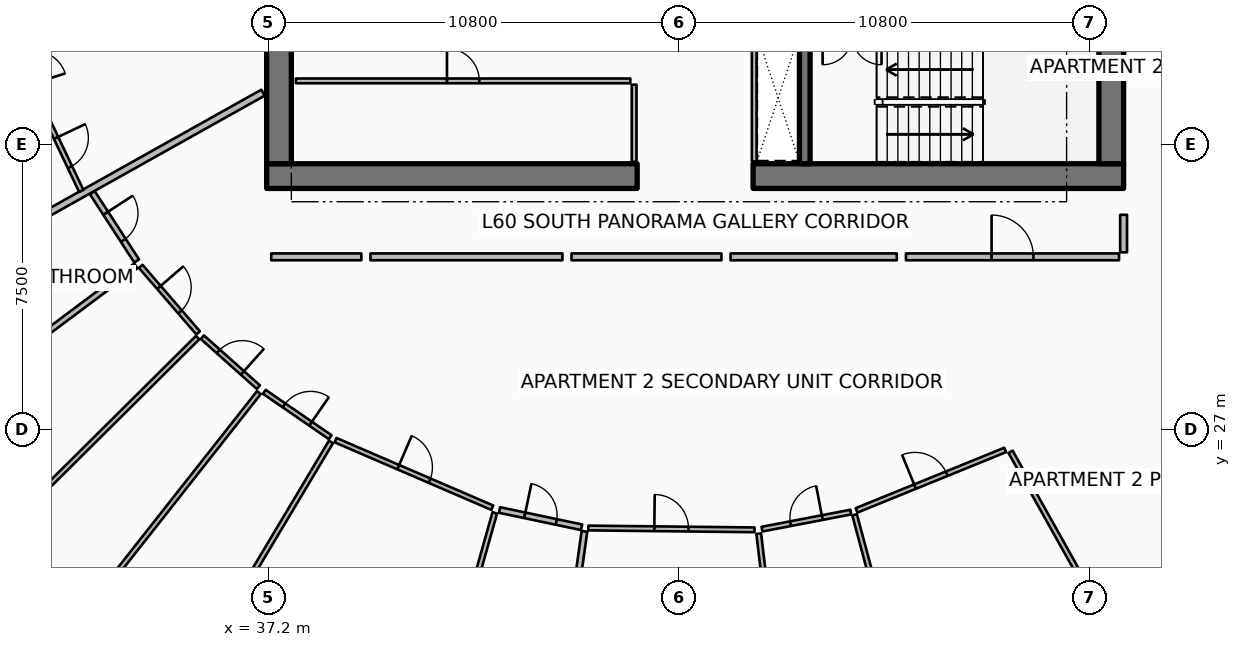
"""IFC4 building model, lengths in metres.
Left out: names, types, materials, properties, quantities, classifications, styles, units other than length and angle.
Written with IfcOpenShell. Run it as: python <this file> out.ifc"""

import sys

from ifc_helpers import new_model, si_unit, direction, frame, frame_2d, origin, place, context, subcontext, project, spatial, rectangle, extrude, element, fill, save


model = new_model("IFC4")
c1 = context("Model", 3, precision=1e-05, world=origin(), true_north=direction((0.0, 1.0)))
c2 = subcontext(c1, "Body", "Model", "MODEL_VIEW")
j1 = project(units=[si_unit("LENGTHUNIT", "METRE"), si_unit("PLANEANGLEUNIT", "RADIAN")], contexts=[c1])
p1 = place(None, origin())
s1 = spatial("IfcSite", under=j1, at=p1, CompositionType="ELEMENT")
p2 = place(p1, origin())
s2 = spatial("IfcBuilding", under=s1, at=p2, CompositionType="ELEMENT")
p3 = place(p2, frame((0.0, 0.0, 240.55)))
s3 = spatial("IfcBuildingStorey", under=s2, at=p3, CompositionType="ELEMENT", Elevation=240.55)
for number, where, z_axis, x_axis in (
    (1, (37.15, 33.675, 0.0), (0.0, 0.0, 1.0), (1.0, 0.0, 0.0)),
    (2, (49.95, 33.675, 0.0), (0.0, 0.0, 1.0), (1.0, 0.0, 0.0)),
):
    element("IfcWall", number, at=place(p3, frame(where, z_axis=z_axis, x_axis=x_axis)), inside=s3, PredefinedType="SHEAR", context=c2, shape_type="SweptSolid", body=[
        extrude(rectangle(XDim=9.75, YDim=0.65, at=frame_2d((4.875, 0.0))), origin(), (0.0, 0.0, 1.0), 3.85),
    ])
for number, where, z_axis, x_axis in (
    (3, (37.475, 34.0, 0.0), (0.0, 0.0, 1.0), (0.0, 1.0, 0.0)),
    (4, (59.375, 34.0, 0.0), (0.0, 0.0, 1.0), (0.0, 1.0, 0.0)),
):
    element("IfcWall", number, at=place(p3, frame(where, z_axis=z_axis, x_axis=x_axis)), inside=s3, PredefinedType="SHEAR", context=c2, shape_type="SweptSolid", body=[
        extrude(rectangle(XDim=16.0, YDim=0.65, at=frame_2d((8.0, 0.0))), origin(), (0.0, 0.0, 1.0), 3.85),
    ])
p4 = place(p3, frame((51.31, 34.0, 0.0), z_axis=(0.0, 0.0, 1.0), x_axis=(0.0, 1.0, 0.0)))
e5 = element("IfcWall", 5, at=p4, inside=s3, PredefinedType="SHEAR", context=c2, shape_type="SweptSolid", body=[
    extrude(rectangle(XDim=3.5, YDim=0.28, at=frame_2d((1.75, 0.0))), origin(), (0.0, 0.0, 1.0), 3.85),
])
p5 = place(p3, frame((46.82, 34.05, 0.0), z_axis=(0.0, 0.0, 1.0), x_axis=(0.0, 1.0, 0.0)))
e6 = element("IfcWall", 6, at=p5, inside=s3, PredefinedType="PARTITIONING", context=c2, shape_type="SweptSolid", body=[
    extrude(rectangle(XDim=2.03, YDim=0.125, at=frame_2d((1.015, 0.0))), origin(), (0.0, 0.0, 1.0), 3.03),
])
p6 = place(p3, frame((37.92, 36.18, 0.0), z_axis=(0.0, 0.0, 1.0), x_axis=(1.0, 0.0, 0.0)))
e7 = element("IfcWall", 7, at=p6, inside=s3, PredefinedType="PARTITIONING", context=c2, shape_type="SweptSolid", body=[
    extrude(rectangle(XDim=8.8, YDim=0.125, at=frame_2d((4.4, 0.0))), origin(), (0.0, 0.0, 1.0), 3.03),
])
p7 = place(p6, frame((3.975, 0.0, 0.0)))
e8 = element("IfcOpeningElement", 8, at=p7, cuts=e7, PredefinedType="OPENING", context=c2, shape_type="SweptSolid", body=[
    extrude(rectangle(XDim=0.85, YDim=2.06, at=frame_2d((0.425, 1.03))), frame((0.0, 0.073, 0.0), z_axis=(0.0, -1.0, 0.0), x_axis=(1.0, 0.0, 0.0)), (0.0, 0.0, 1.0), 0.145),
])
p8 = place(p3, frame((49.98, 34.06, 0.0), z_axis=(0.0, 0.0, 1.0), x_axis=(0.0, 1.0, 0.0)))
e9 = element("IfcWall", 9, at=p8, inside=s3, PredefinedType="PARTITIONING", context=c2, shape_type="SweptSolid", body=[
    extrude(rectangle(XDim=3.4, YDim=0.125, at=frame_2d((1.7, 0.0))), origin(), (0.0, 0.0, 1.0), 3.03),
])
p9 = place(p3, frame((37.054, 35.87, 0.0), z_axis=(0.0, 0.0, 1.0), x_axis=(-0.872490186067, -0.488631635506, 0.0)))
e10 = element("IfcWall", 10, at=p9, inside=s3, PredefinedType="PARTITIONING", context=c2, shape_type="SweptSolid", body=[
    extrude(rectangle(XDim=17.884, YDim=0.18, at=frame_2d((8.942, 0.0))), origin(), (0.0, 0.0, 1.0), 2.957),
])
p10 = place(p3, frame((31.31, 35.306, 0.0), z_axis=(0.0, 0.0, 1.0), x_axis=(0.429468098594, -0.903082029657, 0.0)))
e11 = element("IfcWall", 11, at=p10, inside=s3, PredefinedType="PARTITIONING", context=c2, shape_type="SweptSolid", body=[
    extrude(rectangle(XDim=2.24, YDim=0.125, at=frame_2d((1.12, 0.0))), origin(), (0.0, 0.0, 1.0), 2.957),
])
p11 = place(p10, frame((0.695, 0.0, 0.0)))
e12 = element("IfcOpeningElement", 12, at=p11, cuts=e11, PredefinedType="OPENING", context=c2, shape_type="SweptSolid", body=[
    extrude(rectangle(XDim=0.85, YDim=2.06, at=frame_2d((0.425, 1.03))), frame((0.0, 0.073, 0.0), z_axis=(0.0, -1.0, 0.0), x_axis=(1.0, 0.0, 0.0)), (0.0, 0.0, 1.0), 0.145),
])
p12 = place(p3, frame((53.972, 31.55, 0.0), z_axis=(0.0, 0.0, 1.0), x_axis=(1.0, 0.0, 0.0)))
e13 = element("IfcWall", 13, at=p12, inside=s3, PredefinedType="PARTITIONING", context=c2, shape_type="SweptSolid", body=[
    extrude(rectangle(XDim=5.608, YDim=0.18, at=frame_2d((2.804, 0.0))), origin(), (0.0, 0.0, 1.0), 2.957),
])
p13 = place(p12, frame((2.254, 0.0, 0.0)))
e14 = element("IfcOpeningElement", 14, at=p13, cuts=e13, PredefinedType="OPENING", context=c2, shape_type="SweptSolid", body=[
    extrude(rectangle(XDim=1.1, YDim=2.1, at=frame_2d((0.55, 1.05))), frame((0.0, 0.1, 0.0), z_axis=(0.0, -1.0, 0.0), x_axis=(1.0, 0.0, 0.0)), (0.0, 0.0, 1.0), 0.2),
])
p14 = place(p3, frame((59.7, 31.67, 0.0), z_axis=(0.0, 0.0, 1.0), x_axis=(0.0, 1.0, 0.0)))
e15 = element("IfcWall", 15, at=p14, inside=s3, PredefinedType="PARTITIONING", context=c2, shape_type="SweptSolid", body=[
    extrude(rectangle(XDim=0.987, YDim=0.18, at=frame_2d((0.493, 0.0))), origin(), (0.0, 0.0, 1.0), 2.957),
])
p15 = place(p3, frame((37.27, 31.55, 0.0), z_axis=(0.0, 0.0, 1.0), x_axis=(1.0, 0.0, 0.0)))
e16 = element("IfcWall", 16, at=p15, inside=s3, PredefinedType="PARTITIONING", context=c2, shape_type="SweptSolid", body=[
    extrude(rectangle(XDim=2.372, YDim=0.18, at=frame_2d((1.186, 0.0))), origin(), (0.0, 0.0, 1.0), 2.957),
])
p16 = place(p3, frame((32.562, 33.24, 0.0), z_axis=(0.0, 0.0, 1.0), x_axis=(0.544888302375, -0.838508639154, 0.0)))
e17 = element("IfcWall", 17, at=p16, inside=s3, PredefinedType="PARTITIONING", context=c2, shape_type="SweptSolid", body=[
    extrude(rectangle(XDim=2.144, YDim=0.15, at=frame_2d((1.072, 0.0))), origin(), (0.0, 0.0, 1.0), 2.957),
])
p17 = place(p16, frame((0.647, 0.0, 0.0)))
e18 = element("IfcOpeningElement", 18, at=p17, cuts=e17, PredefinedType="OPENING", context=c2, shape_type="SweptSolid", body=[
    extrude(rectangle(XDim=0.85, YDim=2.06, at=frame_2d((0.425, 1.03))), frame((0.0, 0.085, 0.0), z_axis=(0.0, -1.0, 0.0), x_axis=(1.0, 0.0, 0.0)), (0.0, 0.0, 1.0), 0.17),
])
p18 = place(p3, frame((33.707, 31.312, 0.0), z_axis=(0.0, 0.0, 1.0), x_axis=(-0.800889069655, -0.598812740435, 0.0)))
e19 = element("IfcWall", 19, at=p18, inside=s3, PredefinedType="PARTITIONING", context=c2, shape_type="SweptSolid", body=[
    extrude(rectangle(XDim=3.72, YDim=0.15, at=frame_2d((1.86, 0.0))), origin(), (0.0, 0.0, 1.0), 3.03),
])
p19 = place(p3, frame((35.335, 29.426, 0.0), z_axis=(0.0, 0.0, 1.0), x_axis=(-0.709660425086, -0.704543881576, 0.0)))
e20 = element("IfcWall", 20, at=p19, inside=s3, PredefinedType="PARTITIONING", context=c2, shape_type="SweptSolid", body=[
    extrude(rectangle(XDim=11.738, YDim=0.125, at=frame_2d((5.869, 0.0))), origin(), (0.0, 0.0, 1.0), 3.03),
])
p20 = place(p3, frame((33.838, 31.298, 0.0), z_axis=(0.0, 0.0, 1.0), x_axis=(0.653278423857, -0.757117758954, 0.0)))
e21 = element("IfcWall", 21, at=p20, inside=s3, PredefinedType="PARTITIONING", context=c2, shape_type="SweptSolid", body=[
    extrude(rectangle(XDim=2.309, YDim=0.125, at=frame_2d((1.154, 0.0))), origin(), (0.0, 0.0, 1.0), 3.03),
])
p21 = place(p20, frame((0.729, 0.0, 0.0)))
e22 = element("IfcOpeningElement", 22, at=p21, cuts=e21, PredefinedType="OPENING", context=c2, shape_type="SweptSolid", body=[
    extrude(rectangle(XDim=0.85, YDim=2.06, at=frame_2d((0.425, 1.03))), frame((0.0, 0.073, 0.0), z_axis=(0.0, -1.0, 0.0), x_axis=(1.0, 0.0, 0.0)), (0.0, 0.0, 1.0), 0.145),
])
p22 = place(p3, frame((35.458, 29.436, 0.0), z_axis=(0.0, 0.0, 1.0), x_axis=(0.746255603185, -0.665659503586, 0.0)))
e23 = element("IfcWall", 23, at=p22, inside=s3, PredefinedType="PARTITIONING", context=c2, shape_type="SweptSolid", body=[
    extrude(rectangle(XDim=1.975, YDim=0.125, at=frame_2d((0.988, 0.0))), origin(), (0.0, 0.0, 1.0), 2.957),
])
p23 = place(p22, frame((0.562, 0.0, 0.0)))
e24 = element("IfcOpeningElement", 24, at=p23, cuts=e23, PredefinedType="OPENING", context=c2, shape_type="SweptSolid", body=[
    extrude(rectangle(XDim=0.85, YDim=2.06, at=frame_2d((0.425, 1.03))), frame((0.0, 0.073, 0.0), z_axis=(0.0, -1.0, 0.0), x_axis=(1.0, 0.0, 0.0)), (0.0, 0.0, 1.0), 0.145),
])
p24 = place(p3, frame((39.882, 31.55, 0.0), z_axis=(0.0, 0.0, 1.0), x_axis=(1.0, 0.0, 0.0)))
e25 = element("IfcWall", 25, at=p24, inside=s3, PredefinedType="PARTITIONING", context=c2, shape_type="SweptSolid", body=[
    extrude(rectangle(XDim=5.051, YDim=0.18, at=frame_2d((2.525, 0.0))), origin(), (0.0, 0.0, 1.0), 2.957),
])
p25 = place(p3, frame((36.945, 27.977, 0.0), z_axis=(0.0, 0.0, 1.0), x_axis=(-0.619096573209, -0.785314862358, 0.0)))
e26 = element("IfcWall", 26, at=p25, inside=s3, PredefinedType="PARTITIONING", context=c2, shape_type="SweptSolid", body=[
    extrude(rectangle(XDim=11.739, YDim=0.125, at=frame_2d((5.869, 0.0))), origin(), (0.0, 0.0, 1.0), 2.957),
])
p26 = place(p3, frame((38.843, 26.681, 0.0), z_axis=(0.0, 0.0, 1.0), x_axis=(-0.513080899873, -0.858340253154, 0.0)))
e27 = element("IfcWall", 27, at=p26, inside=s3, PredefinedType="PARTITIONING", context=c2, shape_type="SweptSolid", body=[
    extrude(rectangle(XDim=10.282, YDim=0.125, at=frame_2d((5.141, 0.0))), origin(), (0.0, 0.0, 1.0), 3.03),
])
p27 = place(p3, frame((37.089, 27.998, 0.0), z_axis=(0.0, 0.0, 1.0), x_axis=(0.823534084839, -0.567266790063, 0.0)))
e28 = element("IfcWall", 28, at=p27, inside=s3, PredefinedType="PARTITIONING", context=c2, shape_type="SweptSolid", body=[
    extrude(rectangle(XDim=2.105, YDim=0.125, at=frame_2d((1.053, 0.0))), origin(), (0.0, 0.0, 1.0), 2.957),
])
p28 = place(p27, frame((0.628, 0.0, 0.0)))
e29 = element("IfcOpeningElement", 29, at=p28, cuts=e28, PredefinedType="OPENING", context=c2, shape_type="SweptSolid", body=[
    extrude(rectangle(XDim=0.85, YDim=2.06, at=frame_2d((0.425, 1.03))), frame((0.0, 0.073, 0.0), z_axis=(0.0, -1.0, 0.0), x_axis=(1.0, 0.0, 0.0)), (0.0, 0.0, 1.0), 0.145),
])
p29 = place(p3, frame((38.962, 26.727, 0.0), z_axis=(0.0, 0.0, 1.0), x_axis=(0.918384361194, -0.395689480671, 0.0)))
e30 = element("IfcWall", 30, at=p29, inside=s3, PredefinedType="PARTITIONING", context=c2, shape_type="SweptSolid", body=[
    extrude(rectangle(XDim=4.492, YDim=0.125, at=frame_2d((2.246, 0.0))), origin(), (0.0, 0.0, 1.0), 2.957),
])
p30 = place(p29, frame((1.796, 0.0, 0.0)))
e31 = element("IfcOpeningElement", 31, at=p30, cuts=e30, PredefinedType="OPENING", context=c2, shape_type="SweptSolid", body=[
    extrude(rectangle(XDim=0.9, YDim=2.08, at=frame_2d((0.45, 1.04))), frame((0.0, 0.073, 0.0), z_axis=(0.0, -1.0, 0.0), x_axis=(1.0, 0.0, 0.0)), (0.0, 0.0, 1.0), 0.145),
])
p31 = place(p3, frame((45.173, 31.55, 0.0), z_axis=(0.0, 0.0, 1.0), x_axis=(1.0, 0.0, 0.0)))
e32 = element("IfcWall", 32, at=p31, inside=s3, PredefinedType="PARTITIONING", context=c2, shape_type="SweptSolid", body=[
    extrude(rectangle(XDim=3.944, YDim=0.18, at=frame_2d((1.972, 0.0))), origin(), (0.0, 0.0, 1.0), 2.957),
])
p32 = place(p3, frame((43.153, 24.813, 0.0), z_axis=(0.0, 0.0, 1.0), x_axis=(-0.271434117828, -0.96245702225, 0.0)))
e33 = element("IfcWall", 33, at=p32, inside=s3, PredefinedType="PARTITIONING", context=c2, shape_type="SweptSolid", body=[
    extrude(rectangle(XDim=9.128, YDim=0.125, at=frame_2d((4.564, 0.0))), origin(), (0.0, 0.0, 1.0), 2.957),
])
p33 = place(p3, frame((43.278, 24.889, 0.0), z_axis=(0.0, 0.0, 1.0), x_axis=(0.978579118273, -0.205871098701, 0.0)))
e34 = element("IfcWall", 34, at=p33, inside=s3, PredefinedType="PARTITIONING", context=c2, shape_type="SweptSolid", body=[
    extrude(rectangle(XDim=2.207, YDim=0.15, at=frame_2d((1.104, 0.0))), origin(), (0.0, 0.0, 1.0), 2.957),
])
p34 = place(p33, frame((0.678, 0.0, 0.0)))
e35 = element("IfcOpeningElement", 35, at=p34, cuts=e34, PredefinedType="OPENING", context=c2, shape_type="SweptSolid", body=[
    extrude(rectangle(XDim=0.85, YDim=2.06, at=frame_2d((0.425, 1.03))), frame((0.0, 0.085, 0.0), z_axis=(0.0, -1.0, 0.0), x_axis=(1.0, 0.0, 0.0)), (0.0, 0.0, 1.0), 0.17),
])
p35 = place(p3, frame((45.513, 24.327, 0.0), z_axis=(0.0, 0.0, 1.0), x_axis=(-0.139367219172, -0.990240767804, 0.0)))
e36 = element("IfcWall", 36, at=p35, inside=s3, PredefinedType="PARTITIONING", context=c2, shape_type="SweptSolid", body=[
    extrude(rectangle(XDim=4.46, YDim=0.15, at=frame_2d((2.23, 0.0))), origin(), (0.0, 0.0, 1.0), 3.03),
])
p36 = place(p3, frame((45.615, 24.415, 0.0), z_axis=(0.0, 0.0, 1.0), x_axis=(0.999939484605, -0.011001233021, 0.0)))
e37 = element("IfcWall", 37, at=p36, inside=s3, PredefinedType="PARTITIONING", context=c2, shape_type="SweptSolid", body=[
    extrude(rectangle(XDim=4.372, YDim=0.125, at=frame_2d((2.186, 0.0))), origin(), (0.0, 0.0, 1.0), 3.03),
])
p37 = place(p36, frame((1.736, 0.0, 0.0)))
e38 = element("IfcOpeningElement", 38, at=p37, cuts=e37, PredefinedType="OPENING", context=c2, shape_type="SweptSolid", body=[
    extrude(rectangle(XDim=0.9, YDim=2.08, at=frame_2d((0.45, 1.04))), frame((0.0, 0.073, 0.0), z_axis=(0.0, -1.0, 0.0), x_axis=(1.0, 0.0, 0.0)), (0.0, 0.0, 1.0), 0.145),
])
p38 = place(p3, frame((49.357, 31.55, 0.0), z_axis=(0.0, 0.0, 1.0), x_axis=(1.0, 0.0, 0.0)))
e39 = element("IfcWall", 39, at=p38, inside=s3, PredefinedType="PARTITIONING", context=c2, shape_type="SweptSolid", body=[
    extrude(rectangle(XDim=4.376, YDim=0.18, at=frame_2d((2.188, 0.0))), origin(), (0.0, 0.0, 1.0), 2.957),
])
p39 = place(p3, frame((50.099, 24.267, 0.0), z_axis=(0.0, 0.0, 1.0), x_axis=(0.117541429875, -0.993067979679, 0.0)))
e40 = element("IfcWall", 40, at=p39, inside=s3, PredefinedType="PARTITIONING", context=c2, shape_type="SweptSolid", body=[
    extrude(rectangle(XDim=6.838, YDim=0.125, at=frame_2d((3.419, 0.0))), origin(), (0.0, 0.0, 1.0), 2.957),
])
p40 = place(p3, frame((56.725, 26.42, 0.0), z_axis=(0.0, 0.0, 1.0), x_axis=(0.488624332812, -0.872494275846, 0.0)))
e41 = element("IfcWall", 41, at=p40, inside=s3, PredefinedType="PARTITIONING", context=c2, shape_type="SweptSolid", body=[
    extrude(rectangle(XDim=6.738, YDim=0.125, at=frame_2d((3.369, 0.0))), origin(), (0.0, 0.0, 1.0), 2.957),
])
p41 = place(p3, frame((52.621, 24.762, 0.0), z_axis=(0.0, 0.0, 1.0), x_axis=(0.258970884365, -0.96588512829, 0.0)))
e42 = element("IfcWall", 42, at=p41, inside=s3, PredefinedType="PARTITIONING", context=c2, shape_type="SweptSolid", body=[
    extrude(rectangle(XDim=6.306, YDim=0.125, at=frame_2d((3.153, 0.0))), origin(), (0.0, 0.0, 1.0), 3.03),
])
p42 = place(p3, frame((50.185, 24.385, 0.0), z_axis=(0.0, 0.0, 1.0), x_axis=(0.982037935844, 0.188683577884, 0.0)))
e43 = element("IfcWall", 43, at=p42, inside=s3, PredefinedType="PARTITIONING", context=c2, shape_type="SweptSolid", body=[
    extrude(rectangle(XDim=2.377, YDim=0.125, at=frame_2d((1.188, 0.0))), origin(), (0.0, 0.0, 1.0), 2.957),
])
p43 = place(p42, frame((0.763, 0.0, 0.0)))
e44 = element("IfcOpeningElement", 44, at=p43, cuts=e43, PredefinedType="OPENING", context=c2, shape_type="SweptSolid", body=[
    extrude(rectangle(XDim=0.85, YDim=2.06, at=frame_2d((0.425, 1.03))), frame((0.0, 0.073, 0.0), z_axis=(0.0, -1.0, 0.0), x_axis=(1.0, 0.0, 0.0)), (0.0, 0.0, 1.0), 0.145),
])
p44 = place(p3, frame((52.672, 24.879, 0.0), z_axis=(0.0, 0.0, 1.0), x_axis=(0.926344303187, 0.376677888857, 0.0)))
e45 = element("IfcWall", 45, at=p44, inside=s3, PredefinedType="PARTITIONING", context=c2, shape_type="SweptSolid", body=[
    extrude(rectangle(XDim=4.223, YDim=0.125, at=frame_2d((2.111, 0.0))), origin(), (0.0, 0.0, 1.0), 2.957),
])
p45 = place(p44, frame((1.661, 0.0, 0.0)))
e46 = element("IfcOpeningElement", 46, at=p45, cuts=e45, PredefinedType="OPENING", context=c2, shape_type="SweptSolid", body=[
    extrude(rectangle(XDim=0.9, YDim=2.08, at=frame_2d((0.45, 1.04))), frame((0.0, 0.073, 0.0), z_axis=(0.0, -1.0, 0.0), x_axis=(1.0, 0.0, 0.0)), (0.0, 0.0, 1.0), 0.145),
])
p46 = place(p7, origin())
e47 = element("IfcDoor", 47, at=p46, inside=s3, OperationType="SINGLE_SWING_LEFT", PredefinedType="DOOR", context=c2, shape_type="SweptSolid", body=[
    extrude(rectangle(XDim=0.85, YDim=2.06, at=frame_2d((0.425, 1.03))), frame((0.0, 0.025, 0.0), z_axis=(0.0, -1.0, 0.0), x_axis=(1.0, 0.0, 0.0)), (0.0, 0.0, 1.0), 0.05),
])
fill(e8, e47)
p47 = place(p11, origin())
e48 = element("IfcDoor", 48, at=p47, inside=s3, OperationType="SINGLE_SWING_LEFT", PredefinedType="DOOR", context=c2, shape_type="SweptSolid", body=[
    extrude(rectangle(XDim=0.85, YDim=2.06, at=frame_2d((0.425, 1.03))), frame((0.0, 0.025, 0.0), z_axis=(0.0, -1.0, 0.0), x_axis=(1.0, 0.0, 0.0)), (0.0, 0.0, 1.0), 0.05),
])
fill(e12, e48)
p48 = place(p13, origin())
e49 = element("IfcDoor", 49, at=p48, inside=s3, OperationType="SINGLE_SWING_LEFT", PredefinedType="DOOR", context=c2, shape_type="SweptSolid", body=[
    extrude(rectangle(XDim=1.1, YDim=2.1, at=frame_2d((0.55, 1.05))), frame((0.0, 0.025, 0.0), z_axis=(0.0, -1.0, 0.0), x_axis=(1.0, 0.0, 0.0)), (0.0, 0.0, 1.0), 0.05),
])
fill(e14, e49)
p49 = place(p17, origin())
e50 = element("IfcDoor", 50, at=p49, inside=s3, OperationType="SINGLE_SWING_LEFT", PredefinedType="DOOR", context=c2, shape_type="SweptSolid", body=[
    extrude(rectangle(XDim=0.85, YDim=2.06, at=frame_2d((0.425, 1.03))), frame((0.0, 0.025, 0.0), z_axis=(0.0, -1.0, 0.0), x_axis=(1.0, 0.0, 0.0)), (0.0, 0.0, 1.0), 0.05),
])
fill(e18, e50)
p50 = place(p21, origin())
e51 = element("IfcDoor", 51, at=p50, inside=s3, OperationType="SINGLE_SWING_LEFT", PredefinedType="DOOR", context=c2, shape_type="SweptSolid", body=[
    extrude(rectangle(XDim=0.85, YDim=2.06, at=frame_2d((0.425, 1.03))), frame((0.0, 0.025, 0.0), z_axis=(0.0, -1.0, 0.0), x_axis=(1.0, 0.0, 0.0)), (0.0, 0.0, 1.0), 0.05),
])
fill(e22, e51)
p51 = place(p23, origin())
e52 = element("IfcDoor", 52, at=p51, inside=s3, OperationType="SINGLE_SWING_RIGHT", PredefinedType="DOOR", context=c2, shape_type="SweptSolid", body=[
    extrude(rectangle(XDim=0.85, YDim=2.06, at=frame_2d((0.425, 1.03))), frame((0.0, 0.025, 0.0), z_axis=(0.0, -1.0, 0.0), x_axis=(1.0, 0.0, 0.0)), (0.0, 0.0, 1.0), 0.05),
])
fill(e24, e52)
p52 = place(p28, origin())
e53 = element("IfcDoor", 53, at=p52, inside=s3, OperationType="SINGLE_SWING_RIGHT", PredefinedType="DOOR", context=c2, shape_type="SweptSolid", body=[
    extrude(rectangle(XDim=0.85, YDim=2.06, at=frame_2d((0.425, 1.03))), frame((0.0, 0.025, 0.0), z_axis=(0.0, -1.0, 0.0), x_axis=(1.0, 0.0, 0.0)), (0.0, 0.0, 1.0), 0.05),
])
fill(e29, e53)
p53 = place(p30, origin())
e54 = element("IfcDoor", 54, at=p53, inside=s3, OperationType="SINGLE_SWING_LEFT", PredefinedType="DOOR", context=c2, shape_type="SweptSolid", body=[
    extrude(rectangle(XDim=0.9, YDim=2.08, at=frame_2d((0.45, 1.04))), frame((0.0, 0.025, 0.0), z_axis=(0.0, -1.0, 0.0), x_axis=(1.0, 0.0, 0.0)), (0.0, 0.0, 1.0), 0.05),
])
fill(e31, e54)
p54 = place(p34, origin())
e55 = element("IfcDoor", 55, at=p54, inside=s3, OperationType="SINGLE_SWING_LEFT", PredefinedType="DOOR", context=c2, shape_type="SweptSolid", body=[
    extrude(rectangle(XDim=0.85, YDim=2.06, at=frame_2d((0.425, 1.03))), frame((0.0, 0.025, 0.0), z_axis=(0.0, -1.0, 0.0), x_axis=(1.0, 0.0, 0.0)), (0.0, 0.0, 1.0), 0.05),
])
fill(e35, e55)
p55 = place(p37, origin())
e56 = element("IfcDoor", 56, at=p55, inside=s3, OperationType="SINGLE_SWING_LEFT", PredefinedType="DOOR", context=c2, shape_type="SweptSolid", body=[
    extrude(rectangle(XDim=0.9, YDim=2.08, at=frame_2d((0.45, 1.04))), frame((0.0, 0.025, 0.0), z_axis=(0.0, -1.0, 0.0), x_axis=(1.0, 0.0, 0.0)), (0.0, 0.0, 1.0), 0.05),
])
fill(e38, e56)
p56 = place(p43, origin())
e57 = element("IfcDoor", 57, at=p56, inside=s3, OperationType="SINGLE_SWING_RIGHT", PredefinedType="DOOR", context=c2, shape_type="SweptSolid", body=[
    extrude(rectangle(XDim=0.85, YDim=2.06, at=frame_2d((0.425, 1.03))), frame((0.0, 0.025, 0.0), z_axis=(0.0, -1.0, 0.0), x_axis=(1.0, 0.0, 0.0)), (0.0, 0.0, 1.0), 0.05),
])
fill(e44, e57)
p57 = place(p45, origin())
e58 = element("IfcDoor", 58, at=p57, inside=s3, OperationType="SINGLE_SWING_LEFT", PredefinedType="DOOR", context=c2, shape_type="SweptSolid", body=[
    extrude(rectangle(XDim=0.9, YDim=2.08, at=frame_2d((0.45, 1.04))), frame((0.0, 0.025, 0.0), z_axis=(0.0, -1.0, 0.0), x_axis=(1.0, 0.0, 0.0)), (0.0, 0.0, 1.0), 0.05),
])
fill(e46, e58)
save(model, sys.argv[1])
